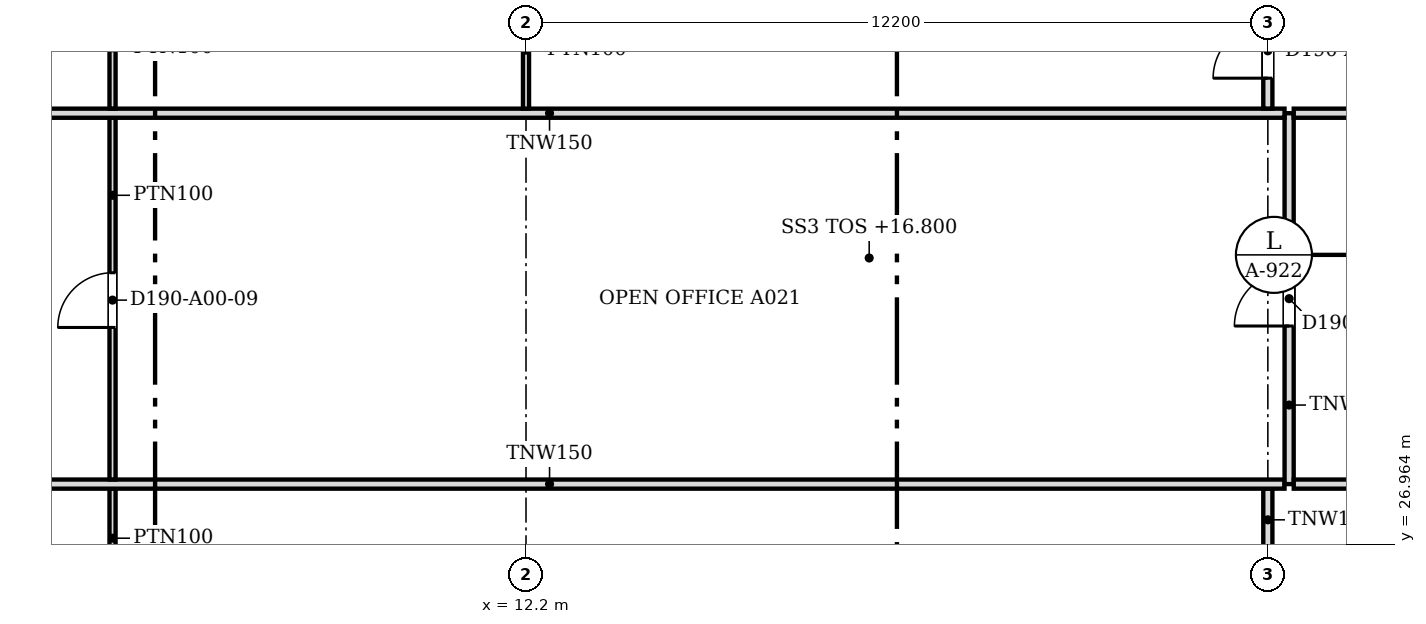
"""IFC4 building model, lengths in metres.
Left out: names, types, materials, properties, quantities, classifications, styles, units other than length and angle.
Written with IfcOpenShell. Run it as: python <this file> out.ifc"""

import sys

from ifc_helpers import new_model, si_unit, direction, frame, frame_2d, origin, place, context, subcontext, project, spatial, rectangle, extrude, source, transform, mapped, element, fill, save


model = new_model("IFC4")
c1 = context("Model", 3, precision=1e-05, world=origin(), true_north=direction((0.0, 1.0)))
c2 = subcontext(c1, "Body", "Model", "MODEL_VIEW")
j1 = project(units=[si_unit("LENGTHUNIT", "METRE"), si_unit("PLANEANGLEUNIT", "RADIAN")], contexts=[c1])
p1 = place(None, origin())
s1 = spatial("IfcSite", under=j1, at=p1, CompositionType="ELEMENT")
p2 = place(p1, origin())
s2 = spatial("IfcBuilding", under=s1, at=p2, CompositionType="ELEMENT")
p3 = place(p2, frame((0.0, 0.0, 16.8)))
s3 = spatial("IfcBuildingStorey", under=s2, at=p3, CompositionType="ELEMENT", Elevation=16.8)
p4 = place(p3, frame((5.4, 23.746, 0.0), z_axis=(0.0, 0.0, 1.0), x_axis=(0.0, 1.0, 0.0)))
e1 = element("IfcWall", 1, at=p4, inside=s3, PredefinedType="PARTITIONING", context=c2, shape_type="SweptSolid", body=[
    extrude(rectangle(XDim=4.128, YDim=0.1, at=frame_2d((2.064, 0.0))), origin(), (0.0, 0.0, 1.0), 3.415),
])
m1 = source(origin(), c2, "Body", "SweptSolid", [
    extrude(rectangle(XDim=0.9, YDim=2.1, at=frame_2d((0.45, 1.05))), frame((0.0, 0.06, 0.0), z_axis=(0.0, -1.0, 0.0), x_axis=(1.0, 0.0, 0.0)), (0.0, 0.0, 1.0), 0.12),
])
p5 = place(p4, frame((1.6, 0.0, 0.0)))
e2 = element("IfcOpeningElement", 2, at=p5, cuts=e1, PredefinedType="OPENING", context=c2, shape_type="MappedRepresentation", body=[
    mapped(m1, transform((0.0, 0.0, 0.0), scale=1.0)),
])
p6 = place(p3, frame((24.4, 24.951, 0.0), z_axis=(0.0, 0.0, 1.0), x_axis=(0.0, 1.0, 0.0)))
e3 = element("IfcWall", 3, at=p6, inside=s3, PredefinedType="PARTITIONING", context=c2, shape_type="SweptSolid", body=[
    extrude(rectangle(XDim=2.923, YDim=0.15, at=frame_2d((1.461, 0.0))), origin(), (0.0, 0.0, 1.0), 3.415),
])
m2 = source(origin(), c2, "Body", "SweptSolid", [
    extrude(rectangle(XDim=0.9, YDim=2.1, at=frame_2d((0.45, 1.05))), frame((0.0, 0.085, 0.0), z_axis=(0.0, -1.0, 0.0), x_axis=(1.0, 0.0, 0.0)), (0.0, 0.0, 1.0), 0.17),
])
p7 = place(p6, frame((1.0, 0.0, 0.0)))
e4 = element("IfcOpeningElement", 4, at=p7, cuts=e3, PredefinedType="OPENING", context=c2, shape_type="MappedRepresentation", body=[
    mapped(m2, transform((0.0, 0.0, 0.0), scale=1.0)),
])
p8 = place(p3, frame((0.5, 27.95, 0.0), z_axis=(0.0, 0.0, 1.0), x_axis=(1.0, 0.0, 0.0)))
e5 = element("IfcWall", 5, at=p8, inside=s3, PredefinedType="PARTITIONING", context=c2, shape_type="SweptSolid", body=[
    extrude(rectangle(XDim=24.174, YDim=0.15, at=frame_2d((12.087, 0.0))), origin(), (0.0, 0.0, 1.0), 3.415),
])
p9 = place(p3, frame((24.75, 27.95, 0.0), z_axis=(0.0, 0.0, 1.0), x_axis=(0.0, 1.0, 0.0)))
e6 = element("IfcWall", 6, at=p9, inside=s3, PredefinedType="PARTITIONING", context=c2, shape_type="SweptSolid", body=[
    extrude(rectangle(XDim=6.1, YDim=0.15, at=frame_2d((3.05, 0.0))), origin(), (0.0, 0.0, 1.0), 3.415),
])
p10 = place(p9, frame((2.6, 0.0, 0.0)))
e7 = element("IfcOpeningElement", 7, at=p10, cuts=e6, PredefinedType="OPENING", context=c2, shape_type="MappedRepresentation", body=[
    mapped(m2, transform((0.0, 0.0, 0.0), scale=1.0)),
])
p11 = place(p3, frame((24.826, 27.95, 0.0), z_axis=(0.0, 0.0, 1.0), x_axis=(1.0, 0.0, 0.0)))
e8 = element("IfcWall", 8, at=p11, inside=s3, PredefinedType="PARTITIONING", context=c2, shape_type="SweptSolid", body=[
    extrude(rectangle(XDim=3.198, YDim=0.15, at=frame_2d((1.599, 0.0))), origin(), (0.0, 0.0, 1.0), 3.415),
])
p12 = place(p3, frame((5.4, 28.026, 0.0), z_axis=(0.0, 0.0, 1.0), x_axis=(0.0, 1.0, 0.0)))
e9 = element("IfcWall", 9, at=p12, inside=s3, PredefinedType="PARTITIONING", context=c2, shape_type="SweptSolid", body=[
    extrude(rectangle(XDim=5.948, YDim=0.1, at=frame_2d((2.974, 0.0))), origin(), (0.0, 0.0, 1.0), 3.415),
])
p13 = place(p12, frame((2.5, 0.0, 0.0)))
e10 = element("IfcOpeningElement", 10, at=p13, cuts=e9, PredefinedType="OPENING", context=c2, shape_type="MappedRepresentation", body=[
    mapped(m1, transform((0.0, 0.0, 0.0), scale=1.0)),
])
p14 = place(p3, frame((0.5, 34.05, 0.0), z_axis=(0.0, 0.0, 1.0), x_axis=(1.0, 0.0, 0.0)))
e11 = element("IfcWall", 11, at=p14, inside=s3, PredefinedType="PARTITIONING", context=c2, shape_type="SweptSolid", body=[
    extrude(rectangle(XDim=24.174, YDim=0.15, at=frame_2d((12.087, 0.0))), origin(), (0.0, 0.0, 1.0), 3.415),
])
p15 = place(p3, frame((24.826, 34.05, 0.0), z_axis=(0.0, 0.0, 1.0), x_axis=(1.0, 0.0, 0.0)))
e12 = element("IfcWall", 12, at=p15, inside=s3, PredefinedType="PARTITIONING", context=c2, shape_type="SweptSolid", body=[
    extrude(rectangle(XDim=3.198, YDim=0.15, at=frame_2d((1.599, 0.0))), origin(), (0.0, 0.0, 1.0), 3.415),
])
p16 = place(p3, frame((5.4, 34.126, 0.0), z_axis=(0.0, 0.0, 1.0), x_axis=(0.0, 1.0, 0.0)))
e13 = element("IfcWall", 13, at=p16, inside=s3, PredefinedType="PARTITIONING", context=c2, shape_type="SweptSolid", body=[
    extrude(rectangle(XDim=4.874, YDim=0.1, at=frame_2d((2.437, 0.0))), origin(), (0.0, 0.0, 1.0), 3.415),
])
p17 = place(p16, frame((2.0, 0.0, 0.0)))
e14 = element("IfcOpeningElement", 14, at=p17, cuts=e13, PredefinedType="OPENING", context=c2, shape_type="MappedRepresentation", body=[
    mapped(m1, transform((0.0, 0.0, 0.0), scale=1.0)),
])
p18 = place(p3, frame((24.4, 34.126, 0.0), z_axis=(0.0, 0.0, 1.0), x_axis=(0.0, 1.0, 0.0)))
e15 = element("IfcWall", 15, at=p18, inside=s3, PredefinedType="PARTITIONING", context=c2, shape_type="SweptSolid", body=[
    extrude(rectangle(XDim=1.923, YDim=0.15, at=frame_2d((0.961, 0.0))), origin(), (0.0, 0.0, 1.0), 3.415),
])
p19 = place(p18, frame((0.5, 0.0, 0.0)))
e16 = element("IfcOpeningElement", 16, at=p19, cuts=e15, PredefinedType="OPENING", context=c2, shape_type="MappedRepresentation", body=[
    mapped(m2, transform((0.0, 0.0, 0.0), scale=1.0)),
])
p20 = place(p3, frame((12.2, 36.05, 0.0), z_axis=(0.0, 0.0, 1.0), x_axis=(0.0, -1.0, 0.0)))
e17 = element("IfcWall", 17, at=p20, inside=s3, PredefinedType="PARTITIONING", context=c2, shape_type="SweptSolid", body=[
    extrude(rectangle(XDim=1.925, YDim=0.1, at=frame_2d((0.962, 0.0))), origin(), (0.0, 0.0, 1.0), 3.415),
])
m3 = source(origin(), c2, "Body", "SweptSolid", [
    extrude(rectangle(XDim=0.9, YDim=2.1, at=frame_2d((0.45, 1.05))), frame((0.0, 0.025, 0.0), z_axis=(0.0, -1.0, 0.0), x_axis=(1.0, 0.0, 0.0)), (0.0, 0.0, 1.0), 0.05),
])
p21 = place(p19, origin())
e18 = element("IfcDoor", 18, at=p21, inside=s3, OperationType="SINGLE_SWING_LEFT", PredefinedType="DOOR", context=c2, shape_type="MappedRepresentation", body=[
    mapped(m3, transform((0.0, 0.0, 0.0), scale=1.0)),
])
fill(e16, e18)
p22 = place(p13, origin())
e19 = element("IfcDoor", 19, at=p22, inside=s3, OperationType="SINGLE_SWING_LEFT", PredefinedType="DOOR", context=c2, shape_type="MappedRepresentation", body=[
    mapped(m3, transform((0.0, 0.0, 0.0), scale=1.0)),
])
fill(e10, e19)
p23 = place(p10, origin())
e20 = element("IfcDoor", 20, at=p23, inside=s3, OperationType="SINGLE_SWING_LEFT", PredefinedType="DOOR", context=c2, shape_type="MappedRepresentation", body=[
    mapped(m3, transform((0.0, 0.0, 0.0), scale=1.0)),
])
fill(e7, e20)
save(model, sys.argv[1])
